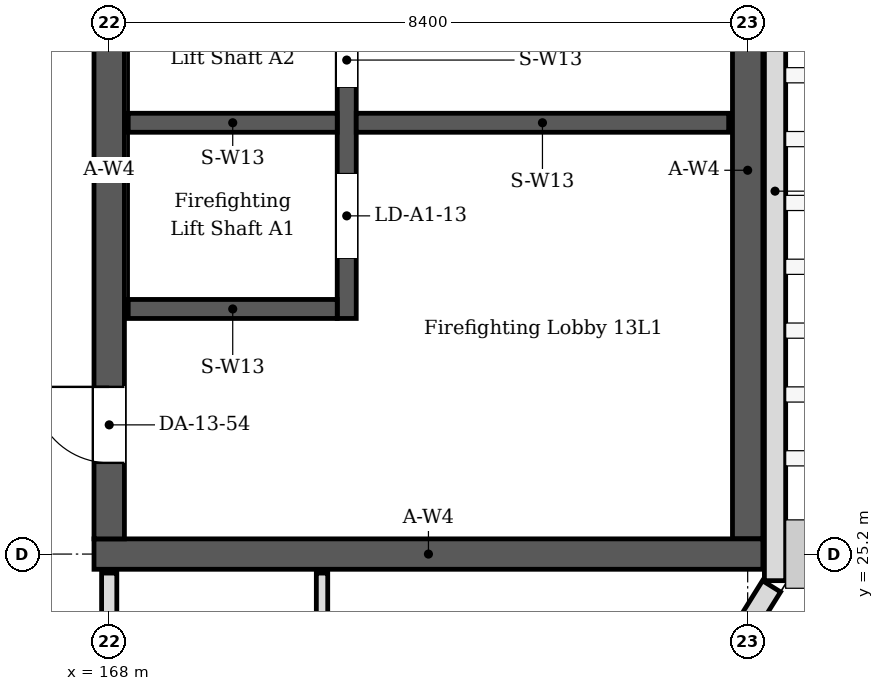
"""IFC4 building model, lengths in metres.
Left out: names, types, materials, properties, quantities, classifications, styles, units other than length and angle.
Written with IfcOpenShell. Run it as: python <this file> out.ifc"""

import sys

from ifc_helpers import new_model, si_unit, direction, frame, frame_2d, origin, place, context, subcontext, project, spatial, rectangle, extrude, element, fill, save


model = new_model("IFC4")
c1 = context("Model", 3, precision=1e-05, world=origin(), true_north=direction((0.0, 1.0)))
c2 = subcontext(c1, "Body", "Model", "MODEL_VIEW")
j1 = project(units=[si_unit("LENGTHUNIT", "METRE"), si_unit("PLANEANGLEUNIT", "RADIAN")], contexts=[c1])
p1 = place(None, origin())
s1 = spatial("IfcSite", under=j1, at=p1, CompositionType="ELEMENT")
p2 = place(p1, origin())
s2 = spatial("IfcBuilding", under=s1, at=p2, CompositionType="ELEMENT")
p3 = place(p2, frame((0.0, 0.0, 56.4)))
s3 = spatial("IfcBuildingStorey", under=s2, at=p3, CompositionType="ELEMENT", Elevation=56.4)
p4 = place(p3, frame((167.8, 25.2, 0.0), z_axis=(0.0, 0.0, 1.0), x_axis=(1.0, 0.0, 0.0)))
e1 = element("IfcWall", 1, at=p4, inside=s3, PredefinedType="SOLIDWALL", context=c2, shape_type="SweptSolid", body=[
    extrude(rectangle(XDim=8.8, YDim=0.4, at=frame_2d((4.4, 0.0))), origin(), (0.0, 0.0, 1.0), 4.05),
])
p5 = place(p3, frame((168.0, 25.4, 0.0), z_axis=(0.0, 0.0, 1.0), x_axis=(0.0, 1.0, 0.0)))
e2 = element("IfcWall", 2, at=p5, inside=s3, PredefinedType="SOLIDWALL", context=c2, shape_type="SweptSolid", body=[
    extrude(rectangle(XDim=16.4, YDim=0.4, at=frame_2d((8.2, 0.0))), origin(), (0.0, 0.0, 1.0), 4.05),
])
p6 = place(p5, frame((1.0, 0.0, 0.0)))
e3 = element("IfcOpeningElement", 3, at=p6, cuts=e2, PredefinedType="OPENING", context=c2, shape_type="SweptSolid", body=[
    extrude(rectangle(XDim=1.0, YDim=2.1, at=frame_2d((0.5, 1.05))), frame((0.0, 0.21, 0.0), z_axis=(0.0, -1.0, 0.0), x_axis=(1.0, 0.0, 0.0)), (0.0, 0.0, 1.0), 0.42),
])
p7 = place(p5, frame((14.4, 0.0, 0.0)))
e4 = element("IfcOpeningElement", 4, at=p7, cuts=e2, PredefinedType="OPENING", context=c2, shape_type="SweptSolid", body=[
    extrude(rectangle(XDim=1.4, YDim=2.1, at=frame_2d((0.7, 1.05))), frame((0.0, 0.21, 0.0), z_axis=(0.0, -1.0, 0.0), x_axis=(1.0, 0.0, 0.0)), (0.0, 0.0, 1.0), 0.42),
])
p8 = place(p3, frame((176.4, 25.4, 0.0), z_axis=(0.0, 0.0, 1.0), x_axis=(0.0, 1.0, 0.0)))
e5 = element("IfcWall", 5, at=p8, inside=s3, PredefinedType="SOLIDWALL", context=c2, shape_type="SweptSolid", body=[
    extrude(rectangle(XDim=16.4, YDim=0.4, at=frame_2d((8.2, 0.0))), origin(), (0.0, 0.0, 1.0), 4.05),
])
p9 = place(p3, frame((174.521, 21.259, 0.0), z_axis=(0.0, 0.0, 1.0), x_axis=(0.529018946142, 0.848610013271, 0.0)))
e6 = element("IfcWall", 6, at=p9, inside=s3, PredefinedType="SOLIDWALL", context=c2, shape_type="SweptSolid", body=[
    extrude(rectangle(XDim=4.144, YDim=0.28, at=frame_2d((2.072, 0.0))), origin(), (0.0, 0.0, 1.0), 4.05),
])
p10 = place(p9, frame((0.812, 0.0, 0.6)))
e7 = element("IfcOpeningElement", 7, at=p10, cuts=e6, PredefinedType="OPENING", context=c2, shape_type="SweptSolid", body=[
    extrude(rectangle(XDim=2.52, YDim=2.4, at=frame_2d((1.26, 1.2))), frame((0.0, 0.15, 0.0), z_axis=(0.0, -1.0, 0.0), x_axis=(1.0, 0.0, 0.0)), (0.0, 0.0, 1.0), 0.3),
])
p11 = place(p3, frame((176.76, 24.85, 0.0), z_axis=(0.0, 0.0, 1.0), x_axis=(0.0, 1.0, 0.0)))
e8 = element("IfcWall", 8, at=p11, inside=s3, PredefinedType="SOLIDWALL", context=c2, shape_type="SweptSolid", body=[
    extrude(rectangle(XDim=42.57, YDim=0.28, at=frame_2d((21.285, 0.0))), origin(), (0.0, 0.0, 1.0), 4.05),
])
p12 = place(p11, frame((18.83, 0.0, 0.6)))
e9 = element("IfcOpeningElement", 9, at=p12, cuts=e8, PredefinedType="OPENING", context=c2, shape_type="SweptSolid", body=[
    extrude(rectangle(XDim=5.04, YDim=2.4, at=frame_2d((2.52, 1.2))), frame((0.0, 0.15, 0.0), z_axis=(0.0, -1.0, 0.0), x_axis=(1.0, 0.0, 0.0)), (0.0, 0.0, 1.0), 0.3),
])
p13 = place(p11, frame((27.23, 0.0, 0.6)))
e10 = element("IfcOpeningElement", 10, at=p13, cuts=e8, PredefinedType="OPENING", context=c2, shape_type="SweptSolid", body=[
    extrude(rectangle(XDim=5.04, YDim=2.4, at=frame_2d((2.52, 1.2))), frame((0.0, 0.15, 0.0), z_axis=(0.0, -1.0, 0.0), x_axis=(1.0, 0.0, 0.0)), (0.0, 0.0, 1.0), 0.3),
])
p14 = place(p3, frame((170.8, 22.8, 0.0), z_axis=(0.0, 0.0, 1.0), x_axis=(0.0, 1.0, 0.0)))
e11 = element("IfcWall", 11, at=p14, inside=s3, PredefinedType="PARTITIONING", context=c2, shape_type="SweptSolid", body=[
    extrude(rectangle(XDim=2.15, YDim=0.15, at=frame_2d((1.075, 0.0))), origin(), (0.0, 0.0, 1.0), 4.05),
])
p15 = place(p3, frame((168.0, 16.95, 0.0), z_axis=(0.0, 0.0, 1.0), x_axis=(0.0, 1.0, 0.0)))
e12 = element("IfcWall", 12, at=p15, inside=s3, PredefinedType="PARTITIONING", context=c2, shape_type="SweptSolid", body=[
    extrude(rectangle(XDim=8.0, YDim=0.2, at=frame_2d((4.0, 0.0))), origin(), (0.0, 0.0, 1.0), 3.45),
])
p16 = place(p15, frame((2.65, 0.0, 0.0)))
e13 = element("IfcOpeningElement", 13, at=p16, cuts=e12, PredefinedType="OPENING", context=c2, shape_type="SweptSolid", body=[
    extrude(rectangle(XDim=1.0, YDim=2.4, at=frame_2d((0.5, 1.2))), frame((0.0, 0.11, 0.0), z_axis=(0.0, -1.0, 0.0), x_axis=(1.0, 0.0, 0.0)), (0.0, 0.0, 1.0), 0.22),
])
p17 = place(p15, frame((4.45, 0.0, 0.0)))
e14 = element("IfcOpeningElement", 14, at=p17, cuts=e12, PredefinedType="OPENING", context=c2, shape_type="SweptSolid", body=[
    extrude(rectangle(XDim=1.0, YDim=2.4, at=frame_2d((0.5, 1.2))), frame((0.0, 0.11, 0.0), z_axis=(0.0, -1.0, 0.0), x_axis=(1.0, 0.0, 0.0)), (0.0, 0.0, 1.0), 0.22),
])
p18 = place(p3, frame((171.125, 28.3, 0.0), z_axis=(0.0, 0.0, 1.0), x_axis=(0.0, 1.0, 0.0)))
e15 = element("IfcWall", 15, at=p18, inside=s3, PredefinedType="SOLIDWALL", context=c2, shape_type="SweptSolid", body=[
    extrude(rectangle(XDim=10.9, YDim=0.25, at=frame_2d((5.45, 0.0))), origin(), (0.0, 0.0, 1.0), 4.05),
])
p19 = place(p18, frame((0.8, 0.0, 0.0)))
e16 = element("IfcOpeningElement", 16, at=p19, cuts=e15, PredefinedType="OPENING", context=c2, shape_type="SweptSolid", body=[
    extrude(rectangle(XDim=1.1, YDim=2.1, at=frame_2d((0.55, 1.05))), frame((0.0, 0.135, 0.0), z_axis=(0.0, -1.0, 0.0), x_axis=(1.0, 0.0, 0.0)), (0.0, 0.0, 1.0), 0.27),
])
p20 = place(p18, frame((3.05, 0.0, 0.0)))
e17 = element("IfcOpeningElement", 17, at=p20, cuts=e15, PredefinedType="OPENING", context=c2, shape_type="SweptSolid", body=[
    extrude(rectangle(XDim=1.1, YDim=2.1, at=frame_2d((0.55, 1.05))), frame((0.0, 0.135, 0.0), z_axis=(0.0, -1.0, 0.0), x_axis=(1.0, 0.0, 0.0)), (0.0, 0.0, 1.0), 0.27),
])
p21 = place(p18, frame((5.1, 0.0, 0.0)))
e18 = element("IfcOpeningElement", 18, at=p21, cuts=e15, PredefinedType="OPENING", context=c2, shape_type="SweptSolid", body=[
    extrude(rectangle(XDim=1.1, YDim=2.1, at=frame_2d((0.55, 1.05))), frame((0.0, 0.135, 0.0), z_axis=(0.0, -1.0, 0.0), x_axis=(1.0, 0.0, 0.0)), (0.0, 0.0, 1.0), 0.27),
])
p22 = place(p18, frame((7.15, 0.0, 0.0)))
e19 = element("IfcOpeningElement", 19, at=p22, cuts=e15, PredefinedType="OPENING", context=c2, shape_type="SweptSolid", body=[
    extrude(rectangle(XDim=1.1, YDim=2.1, at=frame_2d((0.55, 1.05))), frame((0.0, 0.135, 0.0), z_axis=(0.0, -1.0, 0.0), x_axis=(1.0, 0.0, 0.0)), (0.0, 0.0, 1.0), 0.27),
])
p23 = place(p18, frame((9.2, 0.0, 0.0)))
e20 = element("IfcOpeningElement", 20, at=p23, cuts=e15, PredefinedType="OPENING", context=c2, shape_type="SweptSolid", body=[
    extrude(rectangle(XDim=1.1, YDim=2.1, at=frame_2d((0.55, 1.05))), frame((0.0, 0.135, 0.0), z_axis=(0.0, -1.0, 0.0), x_axis=(1.0, 0.0, 0.0)), (0.0, 0.0, 1.0), 0.27),
])
for number, where, z_axis, x_axis in (
    (21, (168.25, 28.425, 0.0), (0.0, 0.0, 1.0), (1.0, 0.0, 0.0)),
    (22, (168.25, 30.875, 0.0), (0.0, 0.0, 1.0), (1.0, 0.0, 0.0)),
):
    element("IfcWall", number, at=place(p3, frame(where, z_axis=z_axis, x_axis=x_axis)), inside=s3, PredefinedType="SOLIDWALL", context=c2, shape_type="SweptSolid", body=[
        extrude(rectangle(XDim=2.75, YDim=0.25, at=frame_2d((1.375, 0.0))), origin(), (0.0, 0.0, 1.0), 4.05),
    ])
p24 = place(p3, frame((171.25, 30.875, 0.0), z_axis=(0.0, 0.0, 1.0), x_axis=(1.0, 0.0, 0.0)))
e23 = element("IfcWall", 23, at=p24, inside=s3, PredefinedType="SOLIDWALL", context=c2, shape_type="SweptSolid", body=[
    extrude(rectangle(XDim=4.9, YDim=0.25, at=frame_2d((2.45, 0.0))), origin(), (0.0, 0.0, 1.0), 4.05),
])
p25 = place(p19, origin())
e24 = element("IfcDoor", 24, at=p25, inside=s3, OperationType="SLIDING_TO_LEFT", PredefinedType="DOOR", context=c2, shape_type="SweptSolid", body=[
    extrude(rectangle(XDim=1.1, YDim=2.1, at=frame_2d((0.55, 1.05))), frame((0.0, 0.025, 0.0), z_axis=(0.0, -1.0, 0.0), x_axis=(1.0, 0.0, 0.0)), (0.0, 0.0, 1.0), 0.05),
])
fill(e16, e24)
p26 = place(p20, origin())
e25 = element("IfcDoor", 25, at=p26, inside=s3, OperationType="SLIDING_TO_LEFT", PredefinedType="DOOR", context=c2, shape_type="SweptSolid", body=[
    extrude(rectangle(XDim=1.1, YDim=2.1, at=frame_2d((0.55, 1.05))), frame((0.0, 0.025, 0.0), z_axis=(0.0, -1.0, 0.0), x_axis=(1.0, 0.0, 0.0)), (0.0, 0.0, 1.0), 0.05),
])
fill(e17, e25)
p27 = place(p6, origin())
e26 = element("IfcDoor", 26, at=p27, inside=s3, OperationType="SINGLE_SWING_RIGHT", PredefinedType="DOOR", context=c2, shape_type="SweptSolid", body=[
    extrude(rectangle(XDim=1.0, YDim=2.1, at=frame_2d((0.5, 1.05))), frame((0.0, 0.025, 0.0), z_axis=(0.0, -1.0, 0.0), x_axis=(1.0, 0.0, 0.0)), (0.0, 0.0, 1.0), 0.05),
])
fill(e3, e26)
save(model, sys.argv[1])
